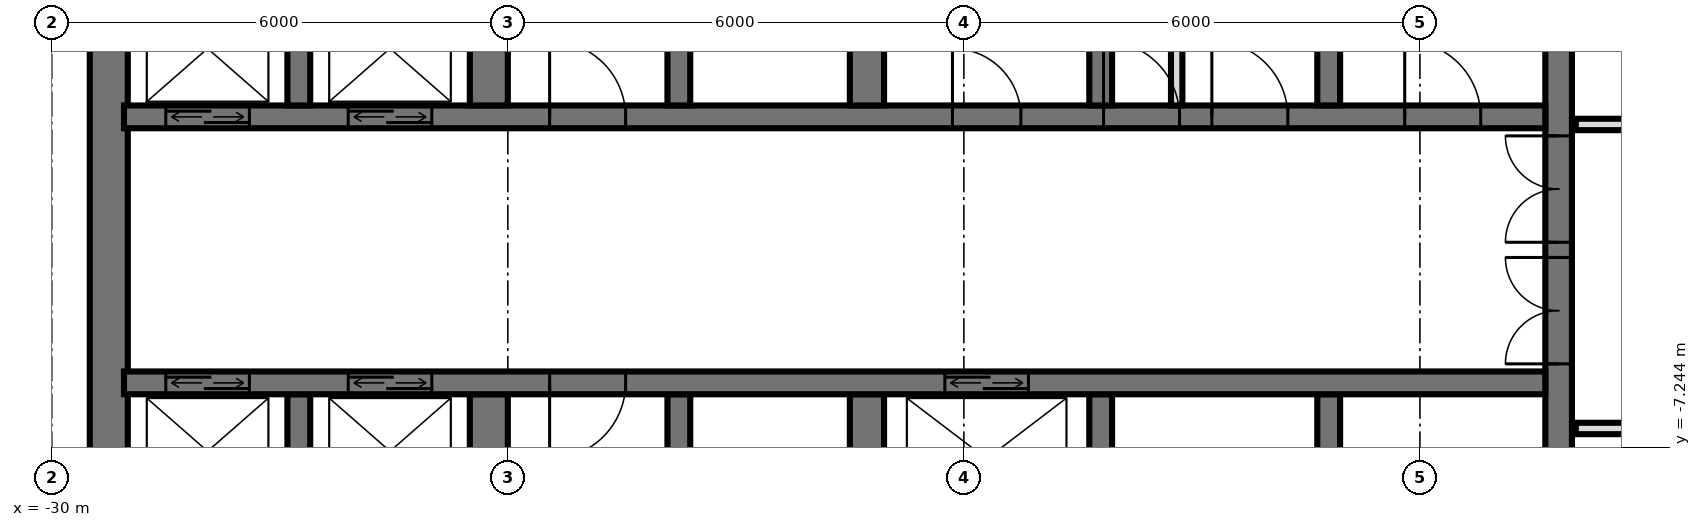
"""IFC4 building model, lengths in metres.
Left out: names, types, materials, properties, quantities, classifications, styles, units other than length and angle.
Written with IfcOpenShell. Run it as: python <this file> out.ifc"""

import sys

from ifc_helpers import new_model, si_unit, direction, frame, frame_2d, origin, place, context, subcontext, project, spatial, rectangle, extrude, element, fill, save


model = new_model("IFC4")
c1 = context("Model", 3, precision=1e-05, world=origin(), true_north=direction((0.0, 1.0)))
c2 = subcontext(c1, "Body", "Model", "MODEL_VIEW")
j1 = project(units=[si_unit("LENGTHUNIT", "METRE"), si_unit("PLANEANGLEUNIT", "RADIAN")], contexts=[c1])
p1 = place(None, origin())
s1 = spatial("IfcSite", under=j1, at=p1, CompositionType="ELEMENT")
p2 = place(p1, origin())
s2 = spatial("IfcBuilding", under=s1, at=p2, CompositionType="ELEMENT")
p3 = place(p2, frame((0.0, 0.0, 92.4)))
s3 = spatial("IfcBuildingStorey", under=s2, at=p3, CompositionType="ELEMENT", Elevation=92.4)
p4 = place(p3, frame((-10.175, -14.55, 0.0), z_axis=(0.0, 0.0, 1.0), x_axis=(0.0, 1.0, 0.0)))
e1 = element("IfcWall", 1, at=p4, inside=s3, PredefinedType="SHEAR", context=c2, shape_type="SweptSolid", body=[
    extrude(rectangle(XDim=14.1, YDim=0.35, at=frame_2d((7.05, 0.0))), origin(), (0.0, 0.0, 1.0), 3.6),
])
p5 = place(p4, frame((8.4, 0.0, 0.0)))
e2 = element("IfcOpeningElement", 2, at=p5, cuts=e1, PredefinedType="OPENING", context=c2, shape_type="SweptSolid", body=[
    extrude(rectangle(XDim=1.4, YDim=2.4, at=frame_2d((0.7, 1.2))), frame((0.0, 0.185, 0.0), z_axis=(0.0, -1.0, 0.0), x_axis=(1.0, 0.0, 0.0)), (0.0, 0.0, 1.0), 0.37),
])
p6 = place(p4, frame((10.0, 0.0, 0.0)))
e3 = element("IfcOpeningElement", 3, at=p6, cuts=e1, PredefinedType="OPENING", context=c2, shape_type="SweptSolid", body=[
    extrude(rectangle(XDim=1.4, YDim=2.4, at=frame_2d((0.7, 1.2))), frame((0.0, 0.185, 0.0), z_axis=(0.0, -1.0, 0.0), x_axis=(1.0, 0.0, 0.0)), (0.0, 0.0, 1.0), 0.37),
])
p7 = place(p4, frame((4.0, 0.0, 0.0)))
e4 = element("IfcOpeningElement", 4, at=p7, cuts=e1, PredefinedType="OPENING", context=c2, shape_type="SweptSolid", body=[
    extrude(rectangle(XDim=1.2, YDim=2.1, at=frame_2d((0.6, 1.05))), frame((0.0, 0.185, 0.0), z_axis=(0.0, -1.0, 0.0), x_axis=(1.0, 0.0, 0.0)), (0.0, 0.0, 1.0), 0.37),
])
p8 = place(p3, frame((-29.25, -14.55, 0.0), z_axis=(0.0, 0.0, 1.0), x_axis=(0.0, 1.0, 0.0)))
e5 = element("IfcWall", 5, at=p8, inside=s3, PredefinedType="SHEAR", context=c2, shape_type="SweptSolid", body=[
    extrude(rectangle(XDim=14.1, YDim=0.5, at=frame_2d((7.05, 0.0))), origin(), (0.0, 0.0, 1.0), 3.6),
])
p9 = place(p3, frame((-29.05, -2.9, 0.0), z_axis=(0.0, 0.0, 1.0), x_axis=(1.0, 0.0, 0.0)))
e6 = element("IfcWall", 6, at=p9, inside=s3, PredefinedType="SHEAR", context=c2, shape_type="SweptSolid", body=[
    extrude(rectangle(XDim=18.7, YDim=0.3, at=frame_2d((9.35, 0.0))), origin(), (0.0, 0.0, 1.0), 3.6),
])
p10 = place(p9, frame((2.95, 0.0, 0.0)))
e7 = element("IfcOpeningElement", 7, at=p10, cuts=e6, PredefinedType="OPENING", context=c2, shape_type="SweptSolid", body=[
    extrude(rectangle(XDim=1.1, YDim=2.1, at=frame_2d((0.55, 1.05))), frame((0.0, 0.16, 0.0), z_axis=(0.0, -1.0, 0.0), x_axis=(1.0, 0.0, 0.0)), (0.0, 0.0, 1.0), 0.32),
])
p11 = place(p9, frame((0.55, 0.0, 0.0)))
e8 = element("IfcOpeningElement", 8, at=p11, cuts=e6, PredefinedType="OPENING", context=c2, shape_type="SweptSolid", body=[
    extrude(rectangle(XDim=1.1, YDim=2.1, at=frame_2d((0.55, 1.05))), frame((0.0, 0.16, 0.0), z_axis=(0.0, -1.0, 0.0), x_axis=(1.0, 0.0, 0.0)), (0.0, 0.0, 1.0), 0.32),
])
p12 = place(p9, frame((10.9, 0.0, 0.0)))
e9 = element("IfcOpeningElement", 9, at=p12, cuts=e6, PredefinedType="OPENING", context=c2, shape_type="SweptSolid", body=[
    extrude(rectangle(XDim=0.9, YDim=2.1, at=frame_2d((0.45, 1.05))), frame((0.0, 0.16, 0.0), z_axis=(0.0, -1.0, 0.0), x_axis=(1.0, 0.0, 0.0)), (0.0, 0.0, 1.0), 0.32),
])
p13 = place(p9, frame((16.85, 0.0, 0.0)))
e10 = element("IfcOpeningElement", 10, at=p13, cuts=e6, PredefinedType="OPENING", context=c2, shape_type="SweptSolid", body=[
    extrude(rectangle(XDim=1.0, YDim=2.1, at=frame_2d((0.5, 1.05))), frame((0.0, 0.16, 0.0), z_axis=(0.0, -1.0, 0.0), x_axis=(1.0, 0.0, 0.0)), (0.0, 0.0, 1.0), 0.32),
])
p14 = place(p9, frame((14.312, 0.0, 0.0)))
e11 = element("IfcOpeningElement", 11, at=p14, cuts=e6, PredefinedType="OPENING", context=c2, shape_type="SweptSolid", body=[
    extrude(rectangle(XDim=1.0, YDim=2.1, at=frame_2d((0.5, 1.05))), frame((0.0, 0.16, 0.0), z_axis=(0.0, -1.0, 0.0), x_axis=(1.0, 0.0, 0.0)), (0.0, 0.0, 1.0), 0.32),
])
p15 = place(p9, frame((12.887, 0.0, 0.0)))
e12 = element("IfcOpeningElement", 12, at=p15, cuts=e6, PredefinedType="OPENING", context=c2, shape_type="SweptSolid", body=[
    extrude(rectangle(XDim=1.0, YDim=2.1, at=frame_2d((0.5, 1.05))), frame((0.0, 0.16, 0.0), z_axis=(0.0, -1.0, 0.0), x_axis=(1.0, 0.0, 0.0)), (0.0, 0.0, 1.0), 0.32),
])
p16 = place(p9, frame((5.6, 0.0, 0.0)))
e13 = element("IfcOpeningElement", 13, at=p16, cuts=e6, PredefinedType="OPENING", context=c2, shape_type="SweptSolid", body=[
    extrude(rectangle(XDim=1.0, YDim=2.1, at=frame_2d((0.5, 1.05))), frame((0.0, 0.16, 0.0), z_axis=(0.0, -1.0, 0.0), x_axis=(1.0, 0.0, 0.0)), (0.0, 0.0, 1.0), 0.32),
])
p17 = place(p3, frame((-29.05, -6.4, 0.0), z_axis=(0.0, 0.0, 1.0), x_axis=(1.0, 0.0, 0.0)))
e14 = element("IfcWall", 14, at=p17, inside=s3, PredefinedType="SHEAR", context=c2, shape_type="SweptSolid", body=[
    extrude(rectangle(XDim=18.7, YDim=0.3, at=frame_2d((9.35, 0.0))), origin(), (0.0, 0.0, 1.0), 3.6),
])
p18 = place(p17, frame((2.95, 0.0, 0.0)))
e15 = element("IfcOpeningElement", 15, at=p18, cuts=e14, PredefinedType="OPENING", context=c2, shape_type="SweptSolid", body=[
    extrude(rectangle(XDim=1.1, YDim=2.1, at=frame_2d((0.55, 1.05))), frame((0.0, 0.16, 0.0), z_axis=(0.0, -1.0, 0.0), x_axis=(1.0, 0.0, 0.0)), (0.0, 0.0, 1.0), 0.32),
])
p19 = place(p17, frame((0.55, 0.0, 0.0)))
e16 = element("IfcOpeningElement", 16, at=p19, cuts=e14, PredefinedType="OPENING", context=c2, shape_type="SweptSolid", body=[
    extrude(rectangle(XDim=1.1, YDim=2.1, at=frame_2d((0.55, 1.05))), frame((0.0, 0.16, 0.0), z_axis=(0.0, -1.0, 0.0), x_axis=(1.0, 0.0, 0.0)), (0.0, 0.0, 1.0), 0.32),
])
p20 = place(p17, frame((10.8, 0.0, 0.0)))
e17 = element("IfcOpeningElement", 17, at=p20, cuts=e14, PredefinedType="OPENING", context=c2, shape_type="SweptSolid", body=[
    extrude(rectangle(XDim=1.1, YDim=2.1, at=frame_2d((0.55, 1.05))), frame((0.0, 0.16, 0.0), z_axis=(0.0, -1.0, 0.0), x_axis=(1.0, 0.0, 0.0)), (0.0, 0.0, 1.0), 0.32),
])
p21 = place(p17, frame((5.6, 0.0, 0.0)))
e18 = element("IfcOpeningElement", 18, at=p21, cuts=e14, PredefinedType="OPENING", context=c2, shape_type="SweptSolid", body=[
    extrude(rectangle(XDim=1.0, YDim=2.1, at=frame_2d((0.5, 1.05))), frame((0.0, 0.16, 0.0), z_axis=(0.0, -1.0, 0.0), x_axis=(1.0, 0.0, 0.0)), (0.0, 0.0, 1.0), 0.32),
])
for number, where, z_axis, x_axis in (
    (19, (-13.2, -2.75, 0.0), (0.0, 0.0, 1.0), (0.0, 1.0, 0.0)),
    (20, (-13.2, -8.85, 0.0), (0.0, 0.0, 1.0), (0.0, 1.0, 0.0)),
    (21, (-16.2, -2.75, 0.0), (0.0, 0.0, 1.0), (0.0, 1.0, 0.0)),
    (22, (-16.2, -8.85, 0.0), (0.0, 0.0, 1.0), (0.0, 1.0, 0.0)),
):
    element("IfcWall", number, at=place(p3, frame(where, z_axis=z_axis, x_axis=x_axis)), inside=s3, PredefinedType="SHEAR", context=c2, shape_type="SweptSolid", body=[
        extrude(rectangle(XDim=2.3, YDim=0.3, at=frame_2d((1.15, 0.0))), origin(), (0.0, 0.0, 1.0), 3.6),
    ])
for number, where, z_axis, x_axis in (
    (23, (-19.275, -2.75, 0.0), (0.0, 0.0, 1.0), (0.0, 1.0, 0.0)),
    (24, (-19.275, -8.85, 0.0), (0.0, 0.0, 1.0), (0.0, 1.0, 0.0)),
):
    element("IfcWall", number, at=place(p3, frame(where, z_axis=z_axis, x_axis=x_axis)), inside=s3, PredefinedType="SHEAR", context=c2, shape_type="SweptSolid", body=[
        extrude(rectangle(XDim=2.3, YDim=0.45, at=frame_2d((1.15, 0.0))), origin(), (0.0, 0.0, 1.0), 3.6),
    ])
for number, where, z_axis, x_axis in (
    (25, (-21.75, -2.75, 0.0), (0.0, 0.0, 1.0), (0.0, 1.0, 0.0)),
    (26, (-21.75, -8.85, 0.0), (0.0, 0.0, 1.0), (0.0, 1.0, 0.0)),
):
    element("IfcWall", number, at=place(p3, frame(where, z_axis=z_axis, x_axis=x_axis)), inside=s3, PredefinedType="SHEAR", context=c2, shape_type="SweptSolid", body=[
        extrude(rectangle(XDim=2.3, YDim=0.3, at=frame_2d((1.15, 0.0))), origin(), (0.0, 0.0, 1.0), 3.6),
    ])
for number, where, z_axis, x_axis in (
    (27, (-24.25, -2.75, 0.0), (0.0, 0.0, 1.0), (0.0, 1.0, 0.0)),
    (28, (-24.25, -8.85, 0.0), (0.0, 0.0, 1.0), (0.0, 1.0, 0.0)),
):
    element("IfcWall", number, at=place(p3, frame(where, z_axis=z_axis, x_axis=x_axis)), inside=s3, PredefinedType="SHEAR", context=c2, shape_type="SweptSolid", body=[
        extrude(rectangle(XDim=2.3, YDim=0.5, at=frame_2d((1.15, 0.0))), origin(), (0.0, 0.0, 1.0), 3.6),
    ])
for number, where, z_axis, x_axis in (
    (29, (-26.75, -2.75, 0.0), (0.0, 0.0, 1.0), (0.0, 1.0, 0.0)),
    (30, (-26.75, -8.85, 0.0), (0.0, 0.0, 1.0), (0.0, 1.0, 0.0)),
):
    element("IfcWall", number, at=place(p3, frame(where, z_axis=z_axis, x_axis=x_axis)), inside=s3, PredefinedType="SHEAR", context=c2, shape_type="SweptSolid", body=[
        extrude(rectangle(XDim=2.3, YDim=0.3, at=frame_2d((1.15, 0.0))), origin(), (0.0, 0.0, 1.0), 3.6),
    ])
p22 = place(p3, frame((-15.2, -2.75, 0.0), z_axis=(0.0, 0.0, 1.0), x_axis=(0.0, 1.0, 0.0)))
e31 = element("IfcWall", 31, at=p22, inside=s3, PredefinedType="PARTITIONING", context=c2, shape_type="SweptSolid", body=[
    extrude(rectangle(XDim=2.3, YDim=0.15, at=frame_2d((1.15, 0.0))), origin(), (0.0, 0.0, 1.0), 3.3),
])
p23 = place(p3, frame((-9.95, -7.0, 0.0), z_axis=(0.0, 0.0, 1.0), x_axis=(1.0, 0.0, 0.0)))
e32 = element("IfcWall", 32, at=p23, inside=s3, PredefinedType="PARTITIONING", context=c2, shape_type="SweptSolid", body=[
    extrude(rectangle(XDim=19.9, YDim=0.15, at=frame_2d((9.95, 0.0))), origin(), (0.0, 0.0, 1.0), 3.32),
])
p24 = place(p23, frame((9.45, 0.0, 0.0)))
e33 = element("IfcOpeningElement", 33, at=p24, cuts=e32, PredefinedType="OPENING", context=c2, shape_type="SweptSolid", body=[
    extrude(rectangle(XDim=1.0, YDim=2.1, at=frame_2d((0.5, 1.05))), frame((0.0, 0.085, 0.0), z_axis=(0.0, -1.0, 0.0), x_axis=(1.0, 0.0, 0.0)), (0.0, 0.0, 1.0), 0.17),
])
p25 = place(p23, frame((3.45, 0.0, 0.0)))
e34 = element("IfcOpeningElement", 34, at=p25, cuts=e32, PredefinedType="OPENING", context=c2, shape_type="SweptSolid", body=[
    extrude(rectangle(XDim=1.0, YDim=2.1, at=frame_2d((0.5, 1.05))), frame((0.0, 0.085, 0.0), z_axis=(0.0, -1.0, 0.0), x_axis=(1.0, 0.0, 0.0)), (0.0, 0.0, 1.0), 0.17),
])
p26 = place(p3, frame((-9.95, -3.0, 0.0), z_axis=(0.0, 0.0, 1.0), x_axis=(1.0, 0.0, 0.0)))
e35 = element("IfcWall", 35, at=p26, inside=s3, PredefinedType="PARTITIONING", context=c2, shape_type="SweptSolid", body=[
    extrude(rectangle(XDim=19.9, YDim=0.15, at=frame_2d((9.95, 0.0))), origin(), (0.0, 0.0, 1.0), 3.32),
])
p27 = place(p26, frame((0.95, 0.0, 0.0)))
e36 = element("IfcOpeningElement", 36, at=p27, cuts=e35, PredefinedType="OPENING", context=c2, shape_type="SweptSolid", body=[
    extrude(rectangle(XDim=1.0, YDim=2.1, at=frame_2d((0.5, 1.05))), frame((0.0, 0.085, 0.0), z_axis=(0.0, -1.0, 0.0), x_axis=(1.0, 0.0, 0.0)), (0.0, 0.0, 1.0), 0.17),
])
p28 = place(p26, frame((3.7, 0.0, 0.0)))
e37 = element("IfcOpeningElement", 37, at=p28, cuts=e35, PredefinedType="OPENING", context=c2, shape_type="SweptSolid", body=[
    extrude(rectangle(XDim=1.0, YDim=2.1, at=frame_2d((0.5, 1.05))), frame((0.0, 0.085, 0.0), z_axis=(0.0, -1.0, 0.0), x_axis=(1.0, 0.0, 0.0)), (0.0, 0.0, 1.0), 0.17),
])
p29 = place(p26, frame((6.7, 0.0, 0.0)))
e38 = element("IfcOpeningElement", 38, at=p29, cuts=e35, PredefinedType="OPENING", context=c2, shape_type="SweptSolid", body=[
    extrude(rectangle(XDim=1.0, YDim=2.1, at=frame_2d((0.5, 1.05))), frame((0.0, 0.085, 0.0), z_axis=(0.0, -1.0, 0.0), x_axis=(1.0, 0.0, 0.0)), (0.0, 0.0, 1.0), 0.17),
])
p30 = place(p26, frame((13.95, 0.0, 0.0)))
e39 = element("IfcOpeningElement", 39, at=p30, cuts=e35, PredefinedType="OPENING", context=c2, shape_type="SweptSolid", body=[
    extrude(rectangle(XDim=1.0, YDim=2.1, at=frame_2d((0.5, 1.05))), frame((0.0, 0.085, 0.0), z_axis=(0.0, -1.0, 0.0), x_axis=(1.0, 0.0, 0.0)), (0.0, 0.0, 1.0), 0.17),
])
p31 = place(p10, origin())
e40 = element("IfcDoor", 40, at=p31, inside=s3, OperationType="DOUBLE_DOOR_SLIDING", PredefinedType="USERDEFINED", context=c2, shape_type="SweptSolid", body=[
    extrude(rectangle(XDim=1.1, YDim=2.1, at=frame_2d((0.55, 1.05))), frame((0.0, 0.025, 0.0), z_axis=(0.0, -1.0, 0.0), x_axis=(1.0, 0.0, 0.0)), (0.0, 0.0, 1.0), 0.05),
])
fill(e7, e40)
p32 = place(p11, origin())
e41 = element("IfcDoor", 41, at=p32, inside=s3, OperationType="DOUBLE_DOOR_SLIDING", PredefinedType="USERDEFINED", context=c2, shape_type="SweptSolid", body=[
    extrude(rectangle(XDim=1.1, YDim=2.1, at=frame_2d((0.55, 1.05))), frame((0.0, 0.025, 0.0), z_axis=(0.0, -1.0, 0.0), x_axis=(1.0, 0.0, 0.0)), (0.0, 0.0, 1.0), 0.05),
])
fill(e8, e41)
p33 = place(p18, origin())
e42 = element("IfcDoor", 42, at=p33, inside=s3, OperationType="DOUBLE_DOOR_SLIDING", PredefinedType="USERDEFINED", context=c2, shape_type="SweptSolid", body=[
    extrude(rectangle(XDim=1.1, YDim=2.1, at=frame_2d((0.55, 1.05))), frame((0.0, 0.025, 0.0), z_axis=(0.0, -1.0, 0.0), x_axis=(1.0, 0.0, 0.0)), (0.0, 0.0, 1.0), 0.05),
])
fill(e15, e42)
p34 = place(p19, origin())
e43 = element("IfcDoor", 43, at=p34, inside=s3, OperationType="DOUBLE_DOOR_SLIDING", PredefinedType="USERDEFINED", context=c2, shape_type="SweptSolid", body=[
    extrude(rectangle(XDim=1.1, YDim=2.1, at=frame_2d((0.55, 1.05))), frame((0.0, 0.025, 0.0), z_axis=(0.0, -1.0, 0.0), x_axis=(1.0, 0.0, 0.0)), (0.0, 0.0, 1.0), 0.05),
])
fill(e16, e43)
p35 = place(p20, origin())
e44 = element("IfcDoor", 44, at=p35, inside=s3, OperationType="DOUBLE_DOOR_SLIDING", PredefinedType="USERDEFINED", context=c2, shape_type="SweptSolid", body=[
    extrude(rectangle(XDim=1.1, YDim=2.1, at=frame_2d((0.55, 1.05))), frame((0.0, 0.025, 0.0), z_axis=(0.0, -1.0, 0.0), x_axis=(1.0, 0.0, 0.0)), (0.0, 0.0, 1.0), 0.05),
])
fill(e17, e44)
p36 = place(p5, origin())
e45 = element("IfcDoor", 45, at=p36, inside=s3, OperationType="DOUBLE_DOOR_SINGLE_SWING", PredefinedType="DOOR", context=c2, shape_type="SweptSolid", body=[
    extrude(rectangle(XDim=1.4, YDim=2.4, at=frame_2d((0.7, 1.2))), frame((0.0, 0.025, 0.0), z_axis=(0.0, -1.0, 0.0), x_axis=(1.0, 0.0, 0.0)), (0.0, 0.0, 1.0), 0.05),
])
fill(e2, e45)
p37 = place(p6, origin())
e46 = element("IfcDoor", 46, at=p37, inside=s3, OperationType="DOUBLE_DOOR_SINGLE_SWING", PredefinedType="DOOR", context=c2, shape_type="SweptSolid", body=[
    extrude(rectangle(XDim=1.4, YDim=2.4, at=frame_2d((0.7, 1.2))), frame((0.0, 0.025, 0.0), z_axis=(0.0, -1.0, 0.0), x_axis=(1.0, 0.0, 0.0)), (0.0, 0.0, 1.0), 0.05),
])
fill(e3, e46)
p38 = place(p12, origin())
e47 = element("IfcDoor", 47, at=p38, inside=s3, OperationType="SINGLE_SWING_RIGHT", PredefinedType="DOOR", context=c2, shape_type="SweptSolid", body=[
    extrude(rectangle(XDim=0.9, YDim=2.1, at=frame_2d((0.45, 1.05))), frame((0.0, 0.025, 0.0), z_axis=(0.0, -1.0, 0.0), x_axis=(1.0, 0.0, 0.0)), (0.0, 0.0, 1.0), 0.05),
])
fill(e9, e47)
p39 = place(p13, origin())
e48 = element("IfcDoor", 48, at=p39, inside=s3, OperationType="SINGLE_SWING_RIGHT", PredefinedType="DOOR", context=c2, shape_type="SweptSolid", body=[
    extrude(rectangle(XDim=1.0, YDim=2.1, at=frame_2d((0.5, 1.05))), frame((0.0, 0.025, 0.0), z_axis=(0.0, -1.0, 0.0), x_axis=(1.0, 0.0, 0.0)), (0.0, 0.0, 1.0), 0.05),
])
fill(e10, e48)
p40 = place(p14, origin())
e49 = element("IfcDoor", 49, at=p40, inside=s3, OperationType="SINGLE_SWING_RIGHT", PredefinedType="DOOR", context=c2, shape_type="SweptSolid", body=[
    extrude(rectangle(XDim=1.0, YDim=2.1, at=frame_2d((0.5, 1.05))), frame((0.0, 0.025, 0.0), z_axis=(0.0, -1.0, 0.0), x_axis=(1.0, 0.0, 0.0)), (0.0, 0.0, 1.0), 0.05),
])
fill(e11, e49)
p41 = place(p15, origin())
e50 = element("IfcDoor", 50, at=p41, inside=s3, OperationType="SINGLE_SWING_RIGHT", PredefinedType="DOOR", context=c2, shape_type="SweptSolid", body=[
    extrude(rectangle(XDim=1.0, YDim=2.1, at=frame_2d((0.5, 1.05))), frame((0.0, 0.025, 0.0), z_axis=(0.0, -1.0, 0.0), x_axis=(1.0, 0.0, 0.0)), (0.0, 0.0, 1.0), 0.05),
])
fill(e12, e50)
p42 = place(p16, origin())
e51 = element("IfcDoor", 51, at=p42, inside=s3, OperationType="SINGLE_SWING_RIGHT", PredefinedType="DOOR", context=c2, shape_type="SweptSolid", body=[
    extrude(rectangle(XDim=1.0, YDim=2.1, at=frame_2d((0.5, 1.05))), frame((0.0, 0.025, 0.0), z_axis=(0.0, -1.0, 0.0), x_axis=(1.0, 0.0, 0.0)), (0.0, 0.0, 1.0), 0.05),
])
fill(e13, e51)
p43 = place(p21, frame((0.5, 0.0, 0.0), z_axis=(0.0, 0.0, 1.0), x_axis=(-1.0, 0.0, 0.0)))
e52 = element("IfcDoor", 52, at=p43, inside=s3, OperationType="SINGLE_SWING_LEFT", PredefinedType="DOOR", context=c2, shape_type="SweptSolid", body=[
    extrude(rectangle(XDim=1.0, YDim=2.1, at=frame_2d((0.0, 1.05))), frame((0.0, -0.025, 0.0), z_axis=(0.0, 1.0, 0.0), x_axis=(-1.0, 0.0, 0.0)), (0.0, 0.0, 1.0), 0.05),
])
fill(e18, e52)
save(model, sys.argv[1])
